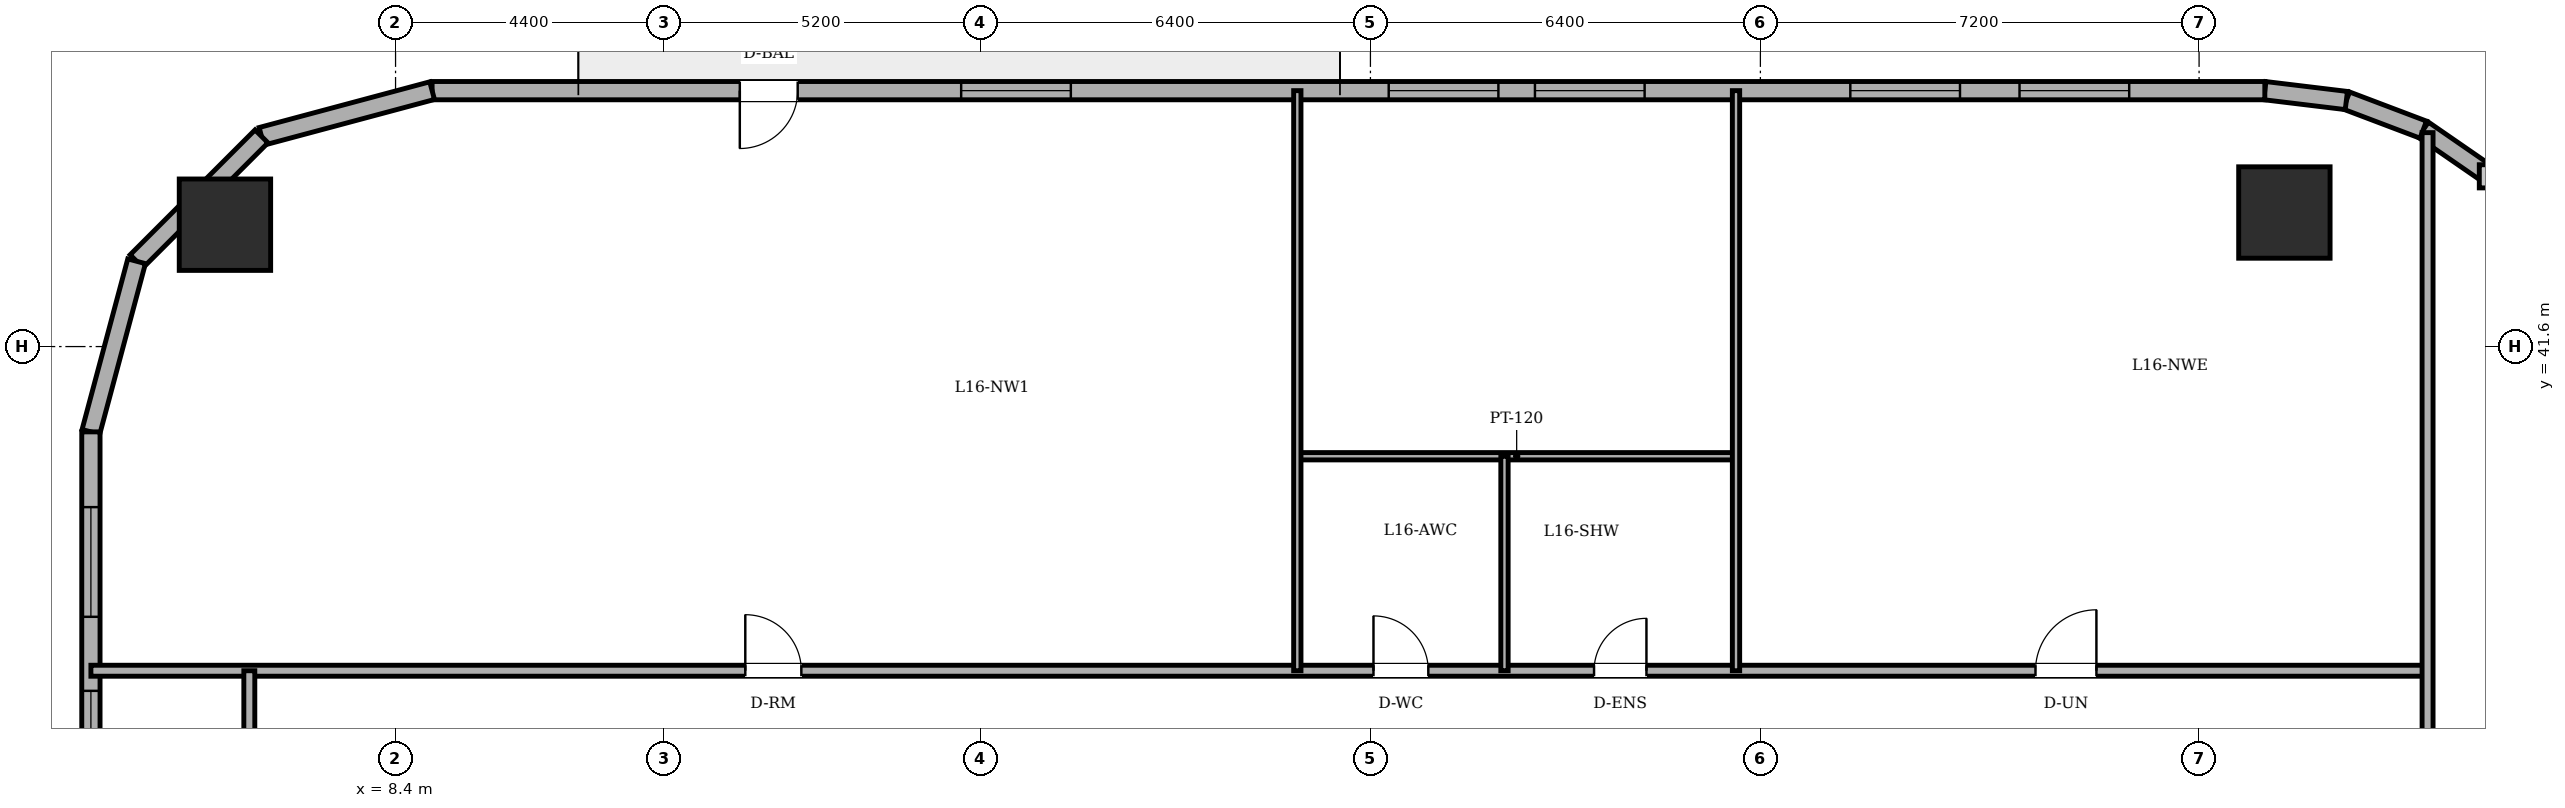
"""IFC4 building model, lengths in metres.
Left out: names, types, materials, properties, quantities, classifications, styles, units other than length and angle.
Written with IfcOpenShell. Run it as: python <this file> out.ifc"""

import sys

from ifc_helpers import new_model, si_unit, direction, frame, frame_2d, origin, origin_2d, place, context, subcontext, project, spatial, rectangle, circle, extrude, element, fill, save


model = new_model("IFC4")
c1 = context("Model", 3, precision=1e-05, world=origin(), true_north=direction((0.0, 1.0)))
c2 = subcontext(c1, "Body", "Model", "MODEL_VIEW")
j1 = project(units=[si_unit("LENGTHUNIT", "METRE"), si_unit("PLANEANGLEUNIT", "RADIAN")], contexts=[c1])
p1 = place(None, origin())
s1 = spatial("IfcSite", under=j1, at=p1, CompositionType="ELEMENT")
p2 = place(p1, origin())
s2 = spatial("IfcBuilding", under=s1, at=p2, CompositionType="ELEMENT")
p3 = place(p2, frame((0.0, 0.0, 61.2)))
s3 = spatial("IfcBuildingStorey", under=s2, at=p3, CompositionType="ELEMENT", Elevation=61.2)
for number, where, z_axis, x_axis in (
    (1, (39.4, 43.8, 0.0), (0.0, 0.0, 1.0), (1.0, 0.0, 0.0)),
    (2, (5.6, 43.6, 0.0), (0.0, 0.0, 1.0), (1.0, 0.0, 0.0)),
):
    element("IfcColumn", number, at=place(p3, frame(where, z_axis=z_axis, x_axis=x_axis)), inside=s3, PredefinedType="COLUMN", context=c2, shape_type="SweptSolid", body=[
        extrude(circle(Radius=0.75, at=origin_2d()), origin(), (0.0, 0.0, 1.0), 3.6),
    ])
p4 = place(p3, frame((42.789, 44.394, 0.0), z_axis=(0.0, 0.0, 1.0), x_axis=(-0.823116500192, 0.567872544777, 0.0)))
e3 = element("IfcWall", 3, at=p4, inside=s3, PredefinedType="SOLIDWALL", context=c2, shape_type="SweptSolid", body=[
    extrude(rectangle(XDim=1.349, YDim=0.3, at=frame_2d((0.674, 0.0))), origin(), (0.0, 0.0, 1.0), 3.4),
])
p5 = place(p3, frame((41.679, 45.16, 0.0), z_axis=(0.0, 0.0, 1.0), x_axis=(-0.935156721165, 0.354234254216, 0.0)))
e4 = element("IfcWall", 4, at=p5, inside=s3, PredefinedType="SOLIDWALL", context=c2, shape_type="SweptSolid", body=[
    extrude(rectangle(XDim=1.349, YDim=0.3, at=frame_2d((0.675, 0.0))), origin(), (0.0, 0.0, 1.0), 3.4),
])
p6 = place(p3, frame((40.417, 45.638, 0.0), z_axis=(0.0, 0.0, 1.0), x_axis=(-0.992739027259, 0.120288086515, 0.0)))
e5 = element("IfcWall", 5, at=p6, inside=s3, PredefinedType="SOLIDWALL", context=c2, shape_type="SweptSolid", body=[
    extrude(rectangle(XDim=1.348, YDim=0.3, at=frame_2d((0.674, 0.0))), origin(), (0.0, 0.0, 1.0), 3.4),
])
p7 = place(p3, frame((39.079, 45.8, 0.0), z_axis=(0.0, 0.0, 1.0), x_axis=(-1.0, 0.0, 0.0)))
e6 = element("IfcWall", 6, at=p7, inside=s3, PredefinedType="SOLIDWALL", context=c2, shape_type="SweptSolid", body=[
    extrude(rectangle(XDim=30.079, YDim=0.3, at=frame_2d((15.04, 0.0))), origin(), (0.0, 0.0, 1.0), 3.4),
])
p8 = place(p7, frame((24.079, 0.0, 0.0)))
e7 = element("IfcOpeningElement", 7, at=p8, cuts=e6, PredefinedType="OPENING", context=c2, shape_type="SweptSolid", body=[
    extrude(rectangle(XDim=0.95, YDim=2.2, at=frame_2d((0.475, 1.1))), frame((0.0, 0.16, 0.0), z_axis=(0.0, -1.0, 0.0), x_axis=(1.0, 0.0, 0.0)), (0.0, 0.0, 1.0), 0.32),
])
p9 = place(p7, frame((2.226, 0.0, 0.85)))
e8 = element("IfcOpeningElement", 8, at=p9, cuts=e6, PredefinedType="OPENING", context=c2, shape_type="SweptSolid", body=[
    extrude(rectangle(XDim=1.8, YDim=1.55, at=frame_2d((0.9, 0.775))), frame((0.0, 0.16, 0.0), z_axis=(0.0, -1.0, 0.0), x_axis=(1.0, 0.0, 0.0)), (0.0, 0.0, 1.0), 0.32),
])
p10 = place(p7, frame((5.003, 0.0, 0.85)))
e9 = element("IfcOpeningElement", 9, at=p10, cuts=e6, PredefinedType="OPENING", context=c2, shape_type="SweptSolid", body=[
    extrude(rectangle(XDim=1.8, YDim=1.55, at=frame_2d((0.9, 0.775))), frame((0.0, 0.16, 0.0), z_axis=(0.0, -1.0, 0.0), x_axis=(1.0, 0.0, 0.0)), (0.0, 0.0, 1.0), 0.32),
])
p11 = place(p7, frame((10.179, 0.0, 0.85)))
e10 = element("IfcOpeningElement", 10, at=p11, cuts=e6, PredefinedType="OPENING", context=c2, shape_type="SweptSolid", body=[
    extrude(rectangle(XDim=1.8, YDim=1.55, at=frame_2d((0.9, 0.775))), frame((0.0, 0.16, 0.0), z_axis=(0.0, -1.0, 0.0), x_axis=(1.0, 0.0, 0.0)), (0.0, 0.0, 1.0), 0.32),
])
p12 = place(p7, frame((12.579, 0.0, 0.85)))
e11 = element("IfcOpeningElement", 11, at=p12, cuts=e6, PredefinedType="OPENING", context=c2, shape_type="SweptSolid", body=[
    extrude(rectangle(XDim=1.8, YDim=1.55, at=frame_2d((0.9, 0.775))), frame((0.0, 0.16, 0.0), z_axis=(0.0, -1.0, 0.0), x_axis=(1.0, 0.0, 0.0)), (0.0, 0.0, 1.0), 0.32),
])
p13 = place(p7, frame((19.596, 0.0, 0.85)))
e12 = element("IfcOpeningElement", 12, at=p13, cuts=e6, PredefinedType="OPENING", context=c2, shape_type="SweptSolid", body=[
    extrude(rectangle(XDim=1.8, YDim=1.55, at=frame_2d((0.9, 0.775))), frame((0.0, 0.16, 0.0), z_axis=(0.0, -1.0, 0.0), x_axis=(1.0, 0.0, 0.0)), (0.0, 0.0, 1.0), 0.32),
])
p14 = place(p3, frame((9.0, 45.8, 0.0), z_axis=(0.0, 0.0, 1.0), x_axis=(-0.96594917914, -0.258731875344, 0.0)))
e13 = element("IfcWall", 13, at=p14, inside=s3, PredefinedType="SOLIDWALL", context=c2, shape_type="SweptSolid", body=[
    extrude(rectangle(XDim=2.899, YDim=0.3, at=frame_2d((1.449, 0.0))), origin(), (0.0, 0.0, 1.0), 3.4),
])
p15 = place(p3, frame((6.2, 45.05, 0.0), z_axis=(0.0, 0.0, 1.0), x_axis=(-0.707106781187, -0.707106781187, 0.0)))
e14 = element("IfcWall", 14, at=p15, inside=s3, PredefinedType="SOLIDWALL", context=c2, shape_type="SweptSolid", body=[
    extrude(rectangle(XDim=2.899, YDim=0.3, at=frame_2d((1.45, 0.0))), origin(), (0.0, 0.0, 1.0), 3.4),
])
p16 = place(p3, frame((4.15, 43.0, 0.0), z_axis=(0.0, 0.0, 1.0), x_axis=(-0.258731875344, -0.96594917914, 0.0)))
e15 = element("IfcWall", 15, at=p16, inside=s3, PredefinedType="SOLIDWALL", context=c2, shape_type="SweptSolid", body=[
    extrude(rectangle(XDim=2.899, YDim=0.3, at=frame_2d((1.449, 0.0))), origin(), (0.0, 0.0, 1.0), 3.4),
])
p17 = place(p3, frame((3.4, 40.2, 0.0), z_axis=(0.0, 0.0, 1.0), x_axis=(0.0, -1.0, 0.0)))
e16 = element("IfcWall", 16, at=p17, inside=s3, PredefinedType="SOLIDWALL", context=c2, shape_type="SweptSolid", body=[
    extrude(rectangle(XDim=32.4, YDim=0.3, at=frame_2d((16.2, 0.0))), origin(), (0.0, 0.0, 1.0), 3.4),
])
p18 = place(p17, frame((1.235, 0.0, 0.85)))
e17 = element("IfcOpeningElement", 17, at=p18, cuts=e16, PredefinedType="OPENING", context=c2, shape_type="SweptSolid", body=[
    extrude(rectangle(XDim=1.8, YDim=1.55, at=frame_2d((0.9, 0.775))), frame((0.0, 0.16, 0.0), z_axis=(0.0, -1.0, 0.0), x_axis=(1.0, 0.0, 0.0)), (0.0, 0.0, 1.0), 0.32),
])
p19 = place(p17, frame((4.25, 0.0, 0.85)))
e18 = element("IfcOpeningElement", 18, at=p19, cuts=e16, PredefinedType="OPENING", context=c2, shape_type="SweptSolid", body=[
    extrude(rectangle(XDim=1.8, YDim=1.55, at=frame_2d((0.9, 0.775))), frame((0.0, 0.16, 0.0), z_axis=(0.0, -1.0, 0.0), x_axis=(1.0, 0.0, 0.0)), (0.0, 0.0, 1.0), 0.32),
])
p20 = place(p17, frame((12.027, 0.0, 0.85)))
e19 = element("IfcOpeningElement", 19, at=p20, cuts=e16, PredefinedType="OPENING", context=c2, shape_type="SweptSolid", body=[
    extrude(rectangle(XDim=1.8, YDim=1.55, at=frame_2d((0.9, 0.775))), frame((0.0, 0.16, 0.0), z_axis=(0.0, -1.0, 0.0), x_axis=(1.0, 0.0, 0.0)), (0.0, 0.0, 1.0), 0.32),
])
p21 = place(p17, frame((18.573, 0.0, 0.85)))
e20 = element("IfcOpeningElement", 20, at=p21, cuts=e16, PredefinedType="OPENING", context=c2, shape_type="SweptSolid", body=[
    extrude(rectangle(XDim=1.8, YDim=1.55, at=frame_2d((0.9, 0.775))), frame((0.0, 0.16, 0.0), z_axis=(0.0, -1.0, 0.0), x_axis=(1.0, 0.0, 0.0)), (0.0, 0.0, 1.0), 0.32),
])
p22 = place(p17, frame((26.35, 0.0, 0.85)))
e21 = element("IfcOpeningElement", 21, at=p22, cuts=e16, PredefinedType="OPENING", context=c2, shape_type="SweptSolid", body=[
    extrude(rectangle(XDim=1.8, YDim=1.55, at=frame_2d((0.9, 0.775))), frame((0.0, 0.16, 0.0), z_axis=(0.0, -1.0, 0.0), x_axis=(1.0, 0.0, 0.0)), (0.0, 0.0, 1.0), 0.32),
])
p23 = place(p17, frame((29.365, 0.0, 0.85)))
e22 = element("IfcOpeningElement", 22, at=p23, cuts=e16, PredefinedType="OPENING", context=c2, shape_type="SweptSolid", body=[
    extrude(rectangle(XDim=1.8, YDim=1.55, at=frame_2d((0.9, 0.775))), frame((0.0, 0.16, 0.0), z_axis=(0.0, -1.0, 0.0), x_axis=(1.0, 0.0, 0.0)), (0.0, 0.0, 1.0), 0.32),
])
p24 = place(p3, frame((3.4, 36.28, 0.0), z_axis=(0.0, 0.0, 1.0), x_axis=(1.0, 0.0, 0.0)))
e23 = element("IfcWall", 23, at=p24, inside=s3, PredefinedType="PARTITIONING", context=c2, shape_type="SweptSolid", body=[
    extrude(rectangle(XDim=38.35, YDim=0.18, at=frame_2d((19.175, 0.0))), origin(), (0.0, 0.0, 1.0), 3.4),
])
p25 = place(p24, frame((21.05, 0.0, 0.0)))
e24 = element("IfcOpeningElement", 24, at=p25, cuts=e23, PredefinedType="OPENING", context=c2, shape_type="SweptSolid", body=[
    extrude(rectangle(XDim=0.9, YDim=2.1, at=frame_2d((0.45, 1.05))), frame((0.0, 0.1, 0.0), z_axis=(0.0, -1.0, 0.0), x_axis=(1.0, 0.0, 0.0)), (0.0, 0.0, 1.0), 0.2),
])
p26 = place(p24, frame((24.67, 0.0, 0.0)))
e25 = element("IfcOpeningElement", 25, at=p26, cuts=e23, PredefinedType="OPENING", context=c2, shape_type="SweptSolid", body=[
    extrude(rectangle(XDim=0.86, YDim=2.1, at=frame_2d((0.43, 1.05))), frame((0.0, 0.1, 0.0), z_axis=(0.0, -1.0, 0.0), x_axis=(1.0, 0.0, 0.0)), (0.0, 0.0, 1.0), 0.2),
])
p27 = place(p24, frame((10.74, 0.0, 0.0)))
e26 = element("IfcOpeningElement", 26, at=p27, cuts=e23, PredefinedType="OPENING", context=c2, shape_type="SweptSolid", body=[
    extrude(rectangle(XDim=0.92, YDim=2.1, at=frame_2d((0.46, 1.05))), frame((0.0, 0.1, 0.0), z_axis=(0.0, -1.0, 0.0), x_axis=(1.0, 0.0, 0.0)), (0.0, 0.0, 1.0), 0.2),
])
p28 = place(p24, frame((31.915, 0.0, 0.0)))
e27 = element("IfcOpeningElement", 27, at=p28, cuts=e23, PredefinedType="OPENING", context=c2, shape_type="SweptSolid", body=[
    extrude(rectangle(XDim=1.0, YDim=2.15, at=frame_2d((0.5, 1.075))), frame((0.0, 0.1, 0.0), z_axis=(0.0, -1.0, 0.0), x_axis=(1.0, 0.0, 0.0)), (0.0, 0.0, 1.0), 0.2),
])
p29 = place(p3, frame((23.2, 39.8, 0.0), z_axis=(0.0, 0.0, 1.0), x_axis=(1.0, 0.0, 0.0)))
e28 = element("IfcWall", 28, at=p29, inside=s3, PredefinedType="PARTITIONING", context=c2, shape_type="SweptSolid", body=[
    extrude(rectangle(XDim=7.2, YDim=0.12, at=frame_2d((3.6, 0.0))), origin(), (0.0, 0.0, 1.0), 3.4),
])
p30 = place(p3, frame((6.0, 33.82, 0.0), z_axis=(0.0, 0.0, 1.0), x_axis=(0.0, 1.0, 0.0)))
e29 = element("IfcWall", 29, at=p30, inside=s3, PredefinedType="PARTITIONING", context=c2, shape_type="SweptSolid", body=[
    extrude(rectangle(XDim=2.46, YDim=0.18, at=frame_2d((1.23, 0.0))), origin(), (0.0, 0.0, 1.0), 3.4),
])
p31 = place(p3, frame((23.2, 36.28, 0.0), z_axis=(0.0, 0.0, 1.0), x_axis=(0.0, 1.0, 0.0)))
e30 = element("IfcWall", 30, at=p31, inside=s3, PredefinedType="PARTITIONING", context=c2, shape_type="SweptSolid", body=[
    extrude(rectangle(XDim=9.52, YDim=0.12, at=frame_2d((4.76, 0.0))), origin(), (0.0, 0.0, 1.0), 3.4),
])
p32 = place(p3, frame((26.6, 36.28, 0.0), z_axis=(0.0, 0.0, 1.0), x_axis=(0.0, 1.0, 0.0)))
e31 = element("IfcWall", 31, at=p32, inside=s3, PredefinedType="PARTITIONING", context=c2, shape_type="SweptSolid", body=[
    extrude(rectangle(XDim=3.52, YDim=0.12, at=frame_2d((1.76, 0.0))), origin(), (0.0, 0.0, 1.0), 3.4),
])
p33 = place(p3, frame((30.4, 36.28, 0.0), z_axis=(0.0, 0.0, 1.0), x_axis=(0.0, 1.0, 0.0)))
e32 = element("IfcWall", 32, at=p33, inside=s3, PredefinedType="PARTITIONING", context=c2, shape_type="SweptSolid", body=[
    extrude(rectangle(XDim=9.52, YDim=0.12, at=frame_2d((4.76, 0.0))), origin(), (0.0, 0.0, 1.0), 3.4),
])
p34 = place(p3, frame((41.75, 25.18, 0.0), z_axis=(0.0, 0.0, 1.0), x_axis=(0.0, 1.0, 0.0)))
e33 = element("IfcWall", 33, at=p34, inside=s3, PredefinedType="PARTITIONING", context=c2, shape_type="SweptSolid", body=[
    extrude(rectangle(XDim=19.931, YDim=0.18, at=frame_2d((9.966, 0.0))), origin(), (0.0, 0.0, 1.0), 2.782),
])
p35 = place(p34, frame((5.35, 0.0, 0.0)))
e34 = element("IfcOpeningElement", 34, at=p35, cuts=e33, PredefinedType="OPENING", context=c2, shape_type="SweptSolid", body=[
    extrude(rectangle(XDim=0.92, YDim=2.1, at=frame_2d((0.46, 1.05))), frame((0.0, 0.1, 0.0), z_axis=(0.0, -1.0, 0.0), x_axis=(1.0, 0.0, 0.0)), (0.0, 0.0, 1.0), 0.2),
])
p36 = place(p8, origin())
e35 = element("IfcDoor", 35, at=p36, inside=s3, OperationType="SINGLE_SWING_RIGHT", PredefinedType="DOOR", context=c2, shape_type="SweptSolid", body=[
    extrude(rectangle(XDim=0.95, YDim=2.2, at=frame_2d((0.475, 1.1))), frame((0.0, 0.025, 0.0), z_axis=(0.0, -1.0, 0.0), x_axis=(1.0, 0.0, 0.0)), (0.0, 0.0, 1.0), 0.05),
])
fill(e7, e35)
p37 = place(p9, origin())
e36 = element("IfcWindow", 36, at=p37, inside=s3, PartitioningType="DOUBLE_PANEL_VERTICAL", PredefinedType="WINDOW", context=c2, shape_type="SweptSolid", body=[
    extrude(rectangle(XDim=1.8, YDim=1.55, at=frame_2d((0.9, 0.775))), frame((0.0, 0.03, 0.0), z_axis=(0.0, -1.0, 0.0), x_axis=(1.0, 0.0, 0.0)), (0.0, 0.0, 1.0), 0.06),
])
fill(e8, e36)
p38 = place(p10, origin())
e37 = element("IfcWindow", 37, at=p38, inside=s3, PartitioningType="DOUBLE_PANEL_VERTICAL", PredefinedType="WINDOW", context=c2, shape_type="SweptSolid", body=[
    extrude(rectangle(XDim=1.8, YDim=1.55, at=frame_2d((0.9, 0.775))), frame((0.0, 0.03, 0.0), z_axis=(0.0, -1.0, 0.0), x_axis=(1.0, 0.0, 0.0)), (0.0, 0.0, 1.0), 0.06),
])
fill(e9, e37)
p39 = place(p11, origin())
e38 = element("IfcWindow", 38, at=p39, inside=s3, PartitioningType="DOUBLE_PANEL_VERTICAL", PredefinedType="WINDOW", context=c2, shape_type="SweptSolid", body=[
    extrude(rectangle(XDim=1.8, YDim=1.55, at=frame_2d((0.9, 0.775))), frame((0.0, 0.03, 0.0), z_axis=(0.0, -1.0, 0.0), x_axis=(1.0, 0.0, 0.0)), (0.0, 0.0, 1.0), 0.06),
])
fill(e10, e38)
p40 = place(p12, origin())
e39 = element("IfcWindow", 39, at=p40, inside=s3, PartitioningType="DOUBLE_PANEL_VERTICAL", PredefinedType="WINDOW", context=c2, shape_type="SweptSolid", body=[
    extrude(rectangle(XDim=1.8, YDim=1.55, at=frame_2d((0.9, 0.775))), frame((0.0, 0.03, 0.0), z_axis=(0.0, -1.0, 0.0), x_axis=(1.0, 0.0, 0.0)), (0.0, 0.0, 1.0), 0.06),
])
fill(e11, e39)
p41 = place(p13, origin())
e40 = element("IfcWindow", 40, at=p41, inside=s3, PartitioningType="DOUBLE_PANEL_VERTICAL", PredefinedType="WINDOW", context=c2, shape_type="SweptSolid", body=[
    extrude(rectangle(XDim=1.8, YDim=1.55, at=frame_2d((0.9, 0.775))), frame((0.0, 0.03, 0.0), z_axis=(0.0, -1.0, 0.0), x_axis=(1.0, 0.0, 0.0)), (0.0, 0.0, 1.0), 0.06),
])
fill(e12, e40)
p42 = place(p18, origin())
e41 = element("IfcWindow", 41, at=p42, inside=s3, PartitioningType="DOUBLE_PANEL_VERTICAL", PredefinedType="WINDOW", context=c2, shape_type="SweptSolid", body=[
    extrude(rectangle(XDim=1.8, YDim=1.55, at=frame_2d((0.9, 0.775))), frame((0.0, 0.03, 0.0), z_axis=(0.0, -1.0, 0.0), x_axis=(1.0, 0.0, 0.0)), (0.0, 0.0, 1.0), 0.06),
])
fill(e17, e41)
p43 = place(p19, origin())
e42 = element("IfcWindow", 42, at=p43, inside=s3, PartitioningType="DOUBLE_PANEL_VERTICAL", PredefinedType="WINDOW", context=c2, shape_type="SweptSolid", body=[
    extrude(rectangle(XDim=1.8, YDim=1.55, at=frame_2d((0.9, 0.775))), frame((0.0, 0.03, 0.0), z_axis=(0.0, -1.0, 0.0), x_axis=(1.0, 0.0, 0.0)), (0.0, 0.0, 1.0), 0.06),
])
fill(e18, e42)
p44 = place(p25, origin())
e43 = element("IfcDoor", 43, at=p44, inside=s3, OperationType="SINGLE_SWING_LEFT", PredefinedType="DOOR", context=c2, shape_type="SweptSolid", body=[
    extrude(rectangle(XDim=0.9, YDim=2.1, at=frame_2d((0.45, 1.05))), frame((0.0, 0.025, 0.0), z_axis=(0.0, -1.0, 0.0), x_axis=(1.0, 0.0, 0.0)), (0.0, 0.0, 1.0), 0.05),
])
fill(e24, e43)
p45 = place(p26, origin())
e44 = element("IfcDoor", 44, at=p45, inside=s3, OperationType="SINGLE_SWING_RIGHT", PredefinedType="DOOR", context=c2, shape_type="SweptSolid", body=[
    extrude(rectangle(XDim=0.86, YDim=2.1, at=frame_2d((0.43, 1.05))), frame((0.0, 0.025, 0.0), z_axis=(0.0, -1.0, 0.0), x_axis=(1.0, 0.0, 0.0)), (0.0, 0.0, 1.0), 0.05),
])
fill(e25, e44)
p46 = place(p27, origin())
e45 = element("IfcDoor", 45, at=p46, inside=s3, OperationType="SINGLE_SWING_LEFT", PredefinedType="DOOR", context=c2, shape_type="SweptSolid", body=[
    extrude(rectangle(XDim=0.92, YDim=2.1, at=frame_2d((0.46, 1.05))), frame((0.0, 0.025, 0.0), z_axis=(0.0, -1.0, 0.0), x_axis=(1.0, 0.0, 0.0)), (0.0, 0.0, 1.0), 0.05),
])
fill(e26, e45)
p47 = place(p28, origin())
e46 = element("IfcDoor", 46, at=p47, inside=s3, OperationType="SINGLE_SWING_RIGHT", PredefinedType="DOOR", context=c2, shape_type="SweptSolid", body=[
    extrude(rectangle(XDim=1.0, YDim=2.15, at=frame_2d((0.5, 1.075))), frame((0.0, 0.025, 0.0), z_axis=(0.0, -1.0, 0.0), x_axis=(1.0, 0.0, 0.0)), (0.0, 0.0, 1.0), 0.05),
])
fill(e27, e46)
save(model, sys.argv[1])
